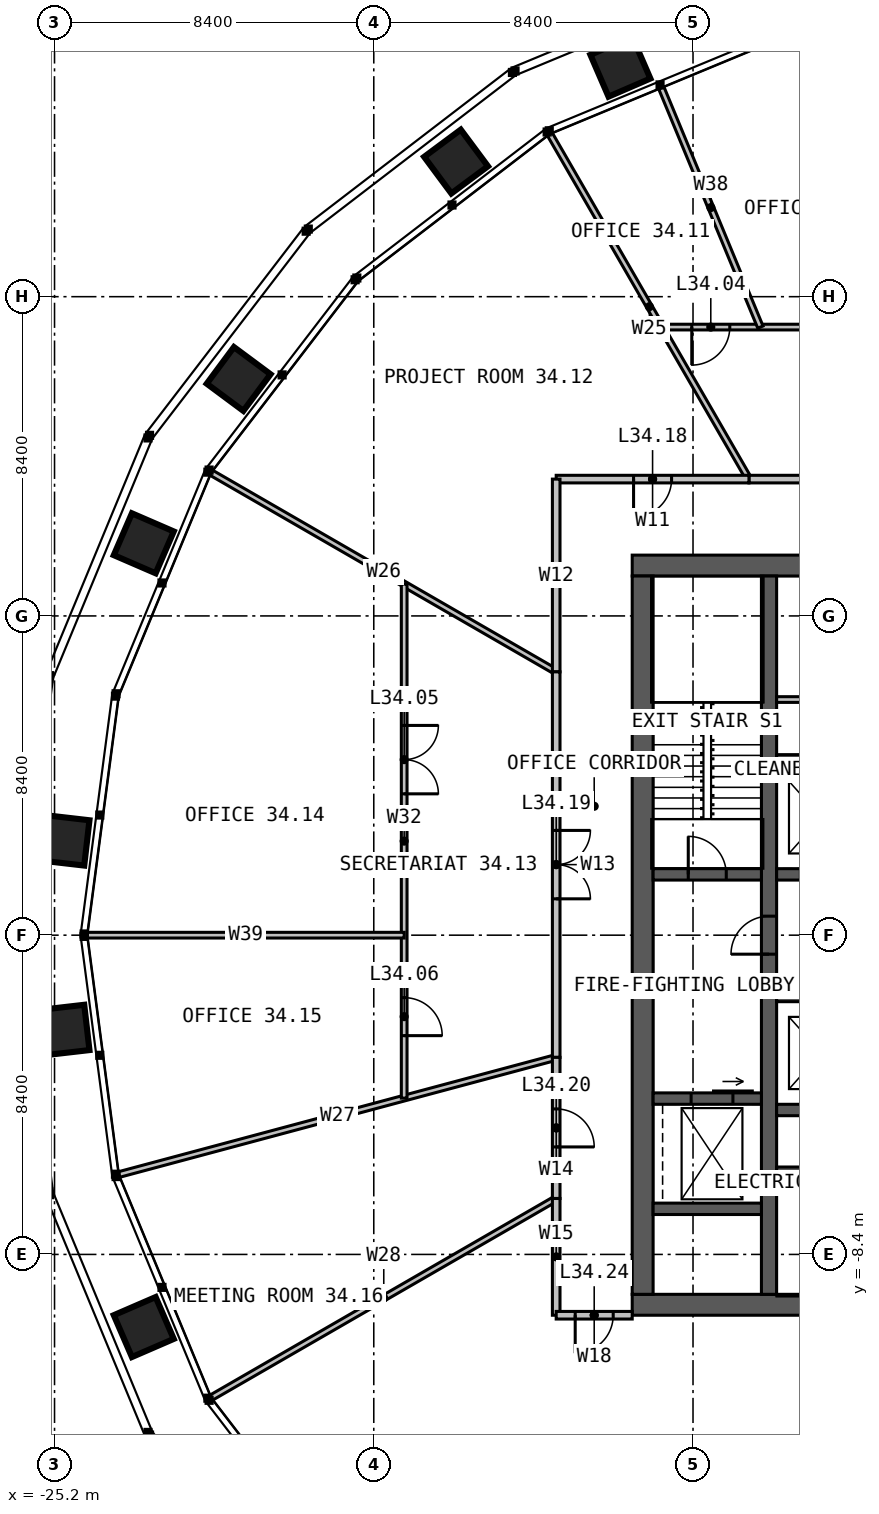
"""IFC4 building model, lengths in metres.
Left out: names, types, materials, properties, quantities, classifications, styles, units other than length and angle.
Written with IfcOpenShell. Run it as: python <this file> out.ifc"""

import sys

from ifc_helpers import new_model, si_unit, direction, frame, frame_2d, origin, place, context, subcontext, project, spatial, rectangle, extrude, element, fill, save


model = new_model("IFC4")
c1 = context("Model", 3, precision=1e-05, world=origin(), true_north=direction((0.0, 1.0)))
c2 = subcontext(c1, "Body", "Model", "MODEL_VIEW")
j1 = project(units=[si_unit("LENGTHUNIT", "METRE"), si_unit("PLANEANGLEUNIT", "RADIAN")], contexts=[c1])
p1 = place(None, origin())
s1 = spatial("IfcSite", under=j1, at=p1, CompositionType="ELEMENT")
p2 = place(p1, origin())
s2 = spatial("IfcBuilding", under=s1, at=p2, CompositionType="ELEMENT")
p3 = place(p2, frame((0.0, 0.0, 142.0)))
s3 = spatial("IfcBuildingStorey", under=s2, at=p3, CompositionType="ELEMENT", Elevation=142.0)
p4 = place(p3, frame((-10.0, 9.725, 0.0), z_axis=(0.0, 0.0, 1.0), x_axis=(1.0, 0.0, 0.0)))
e1 = element("IfcWall", 1, at=p4, inside=s3, PredefinedType="SOLIDWALL", context=c2, shape_type="SweptSolid", body=[
    extrude(rectangle(XDim=20.0, YDim=0.55, at=frame_2d((10.0, 0.0))), origin(), (0.0, 0.0, 1.0), 4.0),
])
p5 = place(p4, frame((9.4, 0.0, 0.0)))
e2 = element("IfcOpeningElement", 2, at=p5, cuts=e1, PredefinedType="OPENING", context=c2, shape_type="SweptSolid", body=[
    extrude(rectangle(XDim=1.2, YDim=2.2, at=frame_2d((0.6, 1.1))), frame((0.0, 0.285, 0.0), z_axis=(0.0, -1.0, 0.0), x_axis=(1.0, 0.0, 0.0)), (0.0, 0.0, 1.0), 0.57),
])
p6 = place(p3, frame((10.0, -9.725, 0.0), z_axis=(0.0, 0.0, 1.0), x_axis=(-1.0, 0.0, 0.0)))
e3 = element("IfcWall", 3, at=p6, inside=s3, PredefinedType="SOLIDWALL", context=c2, shape_type="SweptSolid", body=[
    extrude(rectangle(XDim=20.0, YDim=0.55, at=frame_2d((10.0, 0.0))), origin(), (0.0, 0.0, 1.0), 4.0),
])
p7 = place(p6, frame((6.875, 0.0, 0.0)))
e4 = element("IfcOpeningElement", 4, at=p7, cuts=e3, PredefinedType="OPENING", context=c2, shape_type="SweptSolid", body=[
    extrude(rectangle(XDim=1.2, YDim=2.2, at=frame_2d((0.6, 1.1))), frame((0.0, 0.285, 0.0), z_axis=(0.0, -1.0, 0.0), x_axis=(1.0, 0.0, 0.0)), (0.0, 0.0, 1.0), 0.57),
])
p8 = place(p3, frame((-9.725, 9.45, 0.0), z_axis=(0.0, 0.0, 1.0), x_axis=(0.0, -1.0, 0.0)))
e5 = element("IfcWall", 5, at=p8, inside=s3, PredefinedType="SOLIDWALL", context=c2, shape_type="SweptSolid", body=[
    extrude(rectangle(XDim=18.9, YDim=0.55, at=frame_2d((9.45, 0.0))), origin(), (0.0, 0.0, 1.0), 4.0),
])
p9 = place(p3, frame((-6.4, -9.45, 0.0), z_axis=(0.0, 0.0, 1.0), x_axis=(0.0, 1.0, 0.0)))
e6 = element("IfcWall", 6, at=p9, inside=s3, PredefinedType="SOLIDWALL", context=c2, shape_type="SweptSolid", body=[
    extrude(rectangle(XDim=18.9, YDim=0.4, at=frame_2d((9.45, 0.0))), origin(), (0.0, 0.0, 1.0), 4.0),
])
p10 = place(p9, frame((8.95, 0.0, 0.0)))
e7 = element("IfcOpeningElement", 7, at=p10, cuts=e6, PredefinedType="OPENING", context=c2, shape_type="SweptSolid", body=[
    extrude(rectangle(XDim=1.0, YDim=2.2, at=frame_2d((0.5, 1.1))), frame((0.0, 0.21, 0.0), z_axis=(0.0, -1.0, 0.0), x_axis=(1.0, 0.0, 0.0)), (0.0, 0.0, 1.0), 0.42),
])
p11 = place(p3, frame((-6.2, 1.6, 0.0), z_axis=(0.0, 0.0, 1.0), x_axis=(1.0, 0.0, 0.0)))
e8 = element("IfcWall", 8, at=p11, inside=s3, PredefinedType="SOLIDWALL", context=c2, shape_type="SweptSolid", body=[
    extrude(rectangle(XDim=4.85, YDim=0.3, at=frame_2d((2.425, 0.0))), origin(), (0.0, 0.0, 1.0), 4.0),
])
p12 = place(p11, frame((0.625, 0.0, 0.0)))
e9 = element("IfcOpeningElement", 9, at=p12, cuts=e8, PredefinedType="OPENING", context=c2, shape_type="SweptSolid", body=[
    extrude(rectangle(XDim=1.1, YDim=2.2, at=frame_2d((0.55, 1.1))), frame((0.0, 0.16, 0.0), z_axis=(0.0, -1.0, 0.0), x_axis=(1.0, 0.0, 0.0)), (0.0, 0.0, 1.0), 0.32),
])
p13 = place(p11, frame((3.15, 0.0, 0.0)))
e10 = element("IfcOpeningElement", 10, at=p13, cuts=e8, PredefinedType="OPENING", context=c2, shape_type="SweptSolid", body=[
    extrude(rectangle(XDim=1.1, YDim=2.2, at=frame_2d((0.55, 1.1))), frame((0.0, 0.16, 0.0), z_axis=(0.0, -1.0, 0.0), x_axis=(1.0, 0.0, 0.0)), (0.0, 0.0, 1.0), 0.32),
])
p14 = place(p3, frame((-6.2, 4.6, 0.0), z_axis=(0.0, 0.0, 1.0), x_axis=(1.0, 0.0, 0.0)))
e11 = element("IfcWall", 11, at=p14, inside=s3, PredefinedType="SOLIDWALL", context=c2, shape_type="SweptSolid", body=[
    extrude(rectangle(XDim=4.85, YDim=0.3, at=frame_2d((2.425, 0.0))), origin(), (0.0, 0.0, 1.0), 4.0),
])
for number, where, z_axis, x_axis in (
    (12, (-6.2, -1.6, 0.0), (0.0, 0.0, 1.0), (1.0, 0.0, 0.0)),
    (13, (-6.2, -4.6, 0.0), (0.0, 0.0, 1.0), (1.0, 0.0, 0.0)),
):
    element("IfcWall", number, at=place(p3, frame(where, z_axis=z_axis, x_axis=x_axis)), inside=s3, PredefinedType="SOLIDWALL", context=c2, shape_type="SweptSolid", body=[
        extrude(rectangle(XDim=7.4, YDim=0.3, at=frame_2d((3.7, 0.0))), origin(), (0.0, 0.0, 1.0), 4.0),
    ])
p15 = place(p3, frame((-6.2, -6.2, 0.0), z_axis=(0.0, 0.0, 1.0), x_axis=(1.0, 0.0, 0.0)))
e14 = element("IfcWall", 14, at=p15, inside=s3, PredefinedType="SOLIDWALL", context=c2, shape_type="SweptSolid", body=[
    extrude(rectangle(XDim=7.4, YDim=0.2, at=frame_2d((3.7, 0.0))), origin(), (0.0, 0.0, 1.0), 4.0),
])
p16 = place(p3, frame((-9.45, 1.6, 0.0), z_axis=(0.0, 0.0, 1.0), x_axis=(1.0, 0.0, 0.0)))
e15 = element("IfcWall", 15, at=p16, inside=s3, PredefinedType="SOLIDWALL", context=c2, shape_type="SweptSolid", body=[
    extrude(rectangle(XDim=2.85, YDim=0.3, at=frame_2d((1.425, 0.0))), origin(), (0.0, 0.0, 1.0), 4.0),
])
p17 = place(p16, frame((0.925, 0.0, 0.0)))
e16 = element("IfcOpeningElement", 16, at=p17, cuts=e15, PredefinedType="OPENING", context=c2, shape_type="SweptSolid", body=[
    extrude(rectangle(XDim=1.0, YDim=2.2, at=frame_2d((0.5, 1.1))), frame((0.0, 0.16, 0.0), z_axis=(0.0, -1.0, 0.0), x_axis=(1.0, 0.0, 0.0)), (0.0, 0.0, 1.0), 0.32),
])
p18 = place(p3, frame((-9.45, -4.3, 0.0), z_axis=(0.0, 0.0, 1.0), x_axis=(1.0, 0.0, 0.0)))
e17 = element("IfcWall", 17, at=p18, inside=s3, PredefinedType="SOLIDWALL", context=c2, shape_type="SweptSolid", body=[
    extrude(rectangle(XDim=2.85, YDim=0.3, at=frame_2d((1.425, 0.0))), origin(), (0.0, 0.0, 1.0), 4.0),
])
p19 = place(p18, frame((1.0, 0.0, 0.0)))
e18 = element("IfcOpeningElement", 18, at=p19, cuts=e17, PredefinedType="OPENING", context=c2, shape_type="SweptSolid", body=[
    extrude(rectangle(XDim=1.1, YDim=2.2, at=frame_2d((0.55, 1.1))), frame((0.0, 0.16, 0.0), z_axis=(0.0, -1.0, 0.0), x_axis=(1.0, 0.0, 0.0)), (0.0, 0.0, 1.0), 0.32),
])
p20 = place(p3, frame((-9.45, -7.2, 0.0), z_axis=(0.0, 0.0, 1.0), x_axis=(1.0, 0.0, 0.0)))
e19 = element("IfcWall", 19, at=p20, inside=s3, PredefinedType="SOLIDWALL", context=c2, shape_type="SweptSolid", body=[
    extrude(rectangle(XDim=2.85, YDim=0.3, at=frame_2d((1.425, 0.0))), origin(), (0.0, 0.0, 1.0), 4.0),
])
p21 = place(p3, frame((-6.2, 6.2, 0.0), z_axis=(0.0, 0.0, 1.0), x_axis=(1.0, 0.0, 0.0)))
e20 = element("IfcWall", 20, at=p21, inside=s3, PredefinedType="PARTITIONING", context=c2, shape_type="SweptSolid", body=[
    extrude(rectangle(XDim=4.85, YDim=0.15, at=frame_2d((2.425, 0.0))), origin(), (0.0, 0.0, 1.0), 3.75),
])
p22 = place(p21, frame((3.15, 0.0, 0.0)))
e21 = element("IfcOpeningElement", 21, at=p22, cuts=e20, PredefinedType="OPENING", context=c2, shape_type="SweptSolid", body=[
    extrude(rectangle(XDim=1.0, YDim=2.2, at=frame_2d((0.5, 1.1))), frame((0.0, 0.085, 0.0), z_axis=(0.0, -1.0, 0.0), x_axis=(1.0, 0.0, 0.0)), (0.0, 0.0, 1.0), 0.17),
])
p23 = place(p21, frame((0.75, 0.0, 0.0)))
e22 = element("IfcOpeningElement", 22, at=p23, cuts=e20, PredefinedType="OPENING", context=c2, shape_type="SweptSolid", body=[
    extrude(rectangle(XDim=0.9, YDim=2.2, at=frame_2d((0.45, 1.1))), frame((0.0, 0.085, 0.0), z_axis=(0.0, -1.0, 0.0), x_axis=(1.0, 0.0, 0.0)), (0.0, 0.0, 1.0), 0.17),
])
for number, where, z_axis, x_axis in (
    (23, (-6.928, 12.0, 0.0), (0.0, 0.0, 1.0), (-0.5, 0.866, 0.0)),
    (24, (-12.0, 6.928, 0.0), (0.0, 0.0, 1.0), (-0.866, 0.5, 0.0)),
):
    element("IfcWall", number, at=place(p3, frame(where, z_axis=z_axis, x_axis=x_axis)), inside=s3, PredefinedType="PARTITIONING", context=c2, shape_type="SweptSolid", body=[
        extrude(rectangle(XDim=10.478, YDim=0.15, at=frame_2d((5.239, 0.0))), origin(), (0.0, 0.0, 1.0), 2.79),
    ])
p24 = place(p3, frame((-12.0, -3.215, 0.0), z_axis=(0.0, 0.0, 1.0), x_axis=(-0.965926367889, -0.258817023816, 0.0)))
e25 = element("IfcWall", 25, at=p24, inside=s3, PredefinedType="PARTITIONING", context=c2, shape_type="SweptSolid", body=[
    extrude(rectangle(XDim=11.911, YDim=0.15, at=frame_2d((5.956, 0.0))), origin(), (0.0, 0.0, 1.0), 2.79),
])
p25 = place(p3, frame((-12.0, -6.928, 0.0), z_axis=(0.0, 0.0, 1.0), x_axis=(-0.866029212144, -0.49999340367, 0.0)))
e26 = element("IfcWall", 26, at=p25, inside=s3, PredefinedType="PARTITIONING", context=c2, shape_type="SweptSolid", body=[
    extrude(rectangle(XDim=10.478, YDim=0.15, at=frame_2d((5.239, 0.0))), origin(), (0.0, 0.0, 1.0), 2.79),
])
p26 = place(p3, frame((9.238, 16.0, 0.0), z_axis=(0.0, 0.0, 1.0), x_axis=(-1.0, 0.0, 0.0)))
e27 = element("IfcWall", 27, at=p26, inside=s3, PredefinedType="PARTITIONING", context=c2, shape_type="SweptSolid", body=[
    extrude(rectangle(XDim=18.475, YDim=0.15, at=frame_2d((9.238, 0.0))), origin(), (0.0, 0.0, 1.0), 2.79),
])
p27 = place(p26, frame((3.066, 0.0, 0.0)))
e28 = element("IfcOpeningElement", 28, at=p27, cuts=e27, PredefinedType="OPENING", context=c2, shape_type="SweptSolid", body=[
    extrude(rectangle(XDim=1.0, YDim=2.2, at=frame_2d((0.5, 1.1))), frame((0.0, 0.085, 0.0), z_axis=(0.0, -1.0, 0.0), x_axis=(1.0, 0.0, 0.0)), (0.0, 0.0, 1.0), 0.17),
])
p28 = place(p26, frame((8.738, 0.0, 0.0)))
e29 = element("IfcOpeningElement", 29, at=p28, cuts=e27, PredefinedType="OPENING", context=c2, shape_type="SweptSolid", body=[
    extrude(rectangle(XDim=1.0, YDim=2.2, at=frame_2d((0.5, 1.1))), frame((0.0, 0.085, 0.0), z_axis=(0.0, -1.0, 0.0), x_axis=(1.0, 0.0, 0.0)), (0.0, 0.0, 1.0), 0.17),
])
p29 = place(p26, frame((13.104, 0.0, 0.0)))
e30 = element("IfcOpeningElement", 30, at=p29, cuts=e27, PredefinedType="OPENING", context=c2, shape_type="SweptSolid", body=[
    extrude(rectangle(XDim=1.0, YDim=2.2, at=frame_2d((0.5, 1.1))), frame((0.0, 0.085, 0.0), z_axis=(0.0, -1.0, 0.0), x_axis=(1.0, 0.0, 0.0)), (0.0, 0.0, 1.0), 0.17),
])
p30 = place(p26, frame((16.67, 0.0, 0.0)))
e31 = element("IfcOpeningElement", 31, at=p30, cuts=e27, PredefinedType="OPENING", context=c2, shape_type="SweptSolid", body=[
    extrude(rectangle(XDim=1.0, YDim=2.2, at=frame_2d((0.5, 1.1))), frame((0.0, 0.085, 0.0), z_axis=(0.0, -1.0, 0.0), x_axis=(1.0, 0.0, 0.0)), (0.0, 0.0, 1.0), 0.17),
])
p31 = place(p3, frame((-6.627, 16.0, 0.0), z_axis=(0.0, 0.0, 1.0), x_axis=(-0.382684356981, 0.923879149522, 0.0)))
e32 = element("IfcWall", 32, at=p31, inside=s3, PredefinedType="PARTITIONING", context=c2, shape_type="SweptSolid", body=[
    extrude(rectangle(XDim=6.808, YDim=0.15, at=frame_2d((3.404, 0.0))), origin(), (0.0, 0.0, 1.0), 2.79),
])
p32 = place(p3, frame((6.928, 12.0, 0.0), z_axis=(0.0, 0.0, 1.0), x_axis=(-1.0, 0.0, 0.0)))
e33 = element("IfcWall", 33, at=p32, inside=s3, PredefinedType="PARTITIONING", context=c2, shape_type="SweptSolid", body=[
    extrude(rectangle(XDim=13.856, YDim=0.2, at=frame_2d((6.928, 0.0))), origin(), (0.0, 0.0, 1.0), 3.8),
])
p33 = place(p32, frame((6.028, 0.0, 0.0)))
e34 = element("IfcOpeningElement", 34, at=p33, cuts=e33, PredefinedType="OPENING", context=c2, shape_type="SweptSolid", body=[
    extrude(rectangle(XDim=1.8, YDim=2.2, at=frame_2d((0.9, 1.1))), frame((0.0, 0.11, 0.0), z_axis=(0.0, -1.0, 0.0), x_axis=(1.0, 0.0, 0.0)), (0.0, 0.0, 1.0), 0.22),
])
p34 = place(p3, frame((-6.928, 12.0, 0.0), z_axis=(0.0, 0.0, 1.0), x_axis=(-1.0, 0.0, 0.0)))
e35 = element("IfcWall", 35, at=p34, inside=s3, PredefinedType="PARTITIONING", context=c2, shape_type="SweptSolid", body=[
    extrude(rectangle(XDim=5.072, YDim=0.2, at=frame_2d((2.536, 0.0))), origin(), (0.0, 0.0, 1.0), 3.8),
])
p35 = place(p34, frame((2.036, 0.0, 0.0)))
e36 = element("IfcOpeningElement", 36, at=p35, cuts=e35, PredefinedType="OPENING", context=c2, shape_type="SweptSolid", body=[
    extrude(rectangle(XDim=1.0, YDim=2.2, at=frame_2d((0.5, 1.1))), frame((0.0, 0.11, 0.0), z_axis=(0.0, -1.0, 0.0), x_axis=(1.0, 0.0, 0.0)), (0.0, 0.0, 1.0), 0.22),
])
p36 = place(p3, frame((-12.0, 12.0, 0.0), z_axis=(0.0, 0.0, 1.0), x_axis=(0.0, -1.0, 0.0)))
e37 = element("IfcWall", 37, at=p36, inside=s3, PredefinedType="PARTITIONING", context=c2, shape_type="SweptSolid", body=[
    extrude(rectangle(XDim=5.072, YDim=0.2, at=frame_2d((2.536, 0.0))), origin(), (0.0, 0.0, 1.0), 3.8),
])
p37 = place(p3, frame((-16.0, 9.238, 0.0), z_axis=(0.0, 0.0, 1.0), x_axis=(0.0, -1.0, 0.0)))
e38 = element("IfcWall", 38, at=p37, inside=s3, PredefinedType="PARTITIONING", context=c2, shape_type="SweptSolid", body=[
    extrude(rectangle(XDim=13.525, YDim=0.15, at=frame_2d((6.762, 0.0))), origin(), (0.0, 0.0, 1.0), 2.79),
])
p38 = place(p37, frame((3.719, 0.0, 0.0)))
e39 = element("IfcOpeningElement", 39, at=p38, cuts=e38, PredefinedType="OPENING", context=c2, shape_type="SweptSolid", body=[
    extrude(rectangle(XDim=1.8, YDim=2.2, at=frame_2d((0.9, 1.1))), frame((0.0, 0.085, 0.0), z_axis=(0.0, -1.0, 0.0), x_axis=(1.0, 0.0, 0.0)), (0.0, 0.0, 1.0), 0.17),
])
p39 = place(p37, frame((10.881, 0.0, 0.0)))
e40 = element("IfcOpeningElement", 40, at=p39, cuts=e38, PredefinedType="OPENING", context=c2, shape_type="SweptSolid", body=[
    extrude(rectangle(XDim=1.0, YDim=2.2, at=frame_2d((0.5, 1.1))), frame((0.0, 0.085, 0.0), z_axis=(0.0, -1.0, 0.0), x_axis=(1.0, 0.0, 0.0)), (0.0, 0.0, 1.0), 0.17),
])
p40 = place(p3, frame((-16.0, 0.0, 0.0), z_axis=(0.0, 0.0, 1.0), x_axis=(-1.0, 0.0, 0.0)))
e41 = element("IfcWall", 41, at=p40, inside=s3, PredefinedType="PARTITIONING", context=c2, shape_type="SweptSolid", body=[
    extrude(rectangle(XDim=8.334, YDim=0.15, at=frame_2d((4.167, 0.0))), origin(), (0.0, 0.0, 1.0), 2.79),
])
p41 = place(p3, frame((-12.0, 6.928, 0.0), z_axis=(0.0, 0.0, 1.0), x_axis=(0.0, -1.0, 0.0)))
e42 = element("IfcWall", 42, at=p41, inside=s3, PredefinedType="PARTITIONING", context=c2, shape_type="SweptSolid", body=[
    extrude(rectangle(XDim=10.144, YDim=0.2, at=frame_2d((5.072, 0.0))), origin(), (0.0, 0.0, 1.0), 3.8),
])
p42 = place(p41, frame((4.172, 0.0, 0.0)))
e43 = element("IfcOpeningElement", 43, at=p42, cuts=e42, PredefinedType="OPENING", context=c2, shape_type="SweptSolid", body=[
    extrude(rectangle(XDim=1.8, YDim=2.2, at=frame_2d((0.9, 1.1))), frame((0.0, 0.11, 0.0), z_axis=(0.0, -1.0, 0.0), x_axis=(1.0, 0.0, 0.0)), (0.0, 0.0, 1.0), 0.22),
])
p43 = place(p3, frame((-12.0, -3.215, 0.0), z_axis=(0.0, 0.0, 1.0), x_axis=(0.0, -1.0, 0.0)))
e44 = element("IfcWall", 44, at=p43, inside=s3, PredefinedType="PARTITIONING", context=c2, shape_type="SweptSolid", body=[
    extrude(rectangle(XDim=3.713, YDim=0.2, at=frame_2d((1.856, 0.0))), origin(), (0.0, 0.0, 1.0), 3.8),
])
p44 = place(p43, frame((1.356, 0.0, 0.0)))
e45 = element("IfcOpeningElement", 45, at=p44, cuts=e44, PredefinedType="OPENING", context=c2, shape_type="SweptSolid", body=[
    extrude(rectangle(XDim=1.0, YDim=2.2, at=frame_2d((0.5, 1.1))), frame((0.0, 0.11, 0.0), z_axis=(0.0, -1.0, 0.0), x_axis=(1.0, 0.0, 0.0)), (0.0, 0.0, 1.0), 0.22),
])
p45 = place(p3, frame((-12.0, -6.928, 0.0), z_axis=(0.0, 0.0, 1.0), x_axis=(0.0, -1.0, 0.0)))
e46 = element("IfcWall", 46, at=p45, inside=s3, PredefinedType="PARTITIONING", context=c2, shape_type="SweptSolid", body=[
    extrude(rectangle(XDim=3.072, YDim=0.2, at=frame_2d((1.536, 0.0))), origin(), (0.0, 0.0, 1.0), 3.8),
])
p46 = place(p3, frame((-10.0, -10.0, 0.0), z_axis=(0.0, 0.0, 1.0), x_axis=(-1.0, 0.0, 0.0)))
e47 = element("IfcWall", 47, at=p46, inside=s3, PredefinedType="PARTITIONING", context=c2, shape_type="SweptSolid", body=[
    extrude(rectangle(XDim=2.0, YDim=0.2, at=frame_2d((1.0, 0.0))), origin(), (0.0, 0.0, 1.0), 3.8),
])
p47 = place(p46, frame((0.5, 0.0, 0.0)))
e48 = element("IfcOpeningElement", 48, at=p47, cuts=e47, PredefinedType="OPENING", context=c2, shape_type="SweptSolid", body=[
    extrude(rectangle(XDim=1.0, YDim=2.2, at=frame_2d((0.5, 1.1))), frame((0.0, 0.11, 0.0), z_axis=(0.0, -1.0, 0.0), x_axis=(1.0, 0.0, 0.0)), (0.0, 0.0, 1.0), 0.22),
])
p48 = place(p10, origin())
e49 = element("IfcDoor", 49, at=p48, inside=s3, OperationType="SINGLE_SWING_LEFT", PredefinedType="DOOR", context=c2, shape_type="SweptSolid", body=[
    extrude(rectangle(XDim=1.0, YDim=2.2, at=frame_2d((0.5, 1.1))), frame((0.0, 0.025, 0.0), z_axis=(0.0, -1.0, 0.0), x_axis=(1.0, 0.0, 0.0)), (0.0, 0.0, 1.0), 0.05),
])
fill(e7, e49)
p49 = place(p17, origin())
e50 = element("IfcDoor", 50, at=p49, inside=s3, OperationType="SINGLE_SWING_LEFT", PredefinedType="DOOR", context=c2, shape_type="SweptSolid", body=[
    extrude(rectangle(XDim=1.0, YDim=2.2, at=frame_2d((0.5, 1.1))), frame((0.0, 0.025, 0.0), z_axis=(0.0, -1.0, 0.0), x_axis=(1.0, 0.0, 0.0)), (0.0, 0.0, 1.0), 0.05),
])
fill(e16, e50)
p50 = place(p19, origin())
e51 = element("IfcDoor", 51, at=p50, inside=s3, OperationType="SLIDING_TO_LEFT", PredefinedType="DOOR", context=c2, shape_type="SweptSolid", body=[
    extrude(rectangle(XDim=1.1, YDim=2.2, at=frame_2d((0.55, 1.1))), frame((0.0, 0.025, 0.0), z_axis=(0.0, -1.0, 0.0), x_axis=(1.0, 0.0, 0.0)), (0.0, 0.0, 1.0), 0.05),
])
fill(e18, e51)
p51 = place(p30, origin())
e52 = element("IfcDoor", 52, at=p51, inside=s3, OperationType="SINGLE_SWING_RIGHT", PredefinedType="DOOR", context=c2, shape_type="SweptSolid", body=[
    extrude(rectangle(XDim=1.0, YDim=2.2, at=frame_2d((0.5, 1.1))), frame((0.0, 0.025, 0.0), z_axis=(0.0, -1.0, 0.0), x_axis=(1.0, 0.0, 0.0)), (0.0, 0.0, 1.0), 0.05),
])
fill(e31, e52)
p52 = place(p35, origin())
e53 = element("IfcDoor", 53, at=p52, inside=s3, OperationType="SINGLE_SWING_RIGHT", PredefinedType="DOOR", context=c2, shape_type="SweptSolid", body=[
    extrude(rectangle(XDim=1.0, YDim=2.2, at=frame_2d((0.5, 1.1))), frame((0.0, 0.025, 0.0), z_axis=(0.0, -1.0, 0.0), x_axis=(1.0, 0.0, 0.0)), (0.0, 0.0, 1.0), 0.05),
])
fill(e36, e53)
p53 = place(p38, origin())
e54 = element("IfcDoor", 54, at=p53, inside=s3, OperationType="DOUBLE_DOOR_SINGLE_SWING", PredefinedType="DOOR", context=c2, shape_type="SweptSolid", body=[
    extrude(rectangle(XDim=1.8, YDim=2.2, at=frame_2d((0.9, 1.1))), frame((0.0, 0.025, 0.0), z_axis=(0.0, -1.0, 0.0), x_axis=(1.0, 0.0, 0.0)), (0.0, 0.0, 1.0), 0.05),
])
fill(e39, e54)
p54 = place(p39, origin())
e55 = element("IfcDoor", 55, at=p54, inside=s3, OperationType="SINGLE_SWING_RIGHT", PredefinedType="DOOR", context=c2, shape_type="SweptSolid", body=[
    extrude(rectangle(XDim=1.0, YDim=2.2, at=frame_2d((0.5, 1.1))), frame((0.0, 0.025, 0.0), z_axis=(0.0, -1.0, 0.0), x_axis=(1.0, 0.0, 0.0)), (0.0, 0.0, 1.0), 0.05),
])
fill(e40, e55)
p55 = place(p42, origin())
e56 = element("IfcDoor", 56, at=p55, inside=s3, OperationType="DOUBLE_DOOR_SINGLE_SWING", PredefinedType="DOOR", context=c2, shape_type="SweptSolid", body=[
    extrude(rectangle(XDim=1.8, YDim=2.2, at=frame_2d((0.9, 1.1))), frame((0.0, 0.025, 0.0), z_axis=(0.0, -1.0, 0.0), x_axis=(1.0, 0.0, 0.0)), (0.0, 0.0, 1.0), 0.05),
])
fill(e43, e56)
p56 = place(p44, origin())
e57 = element("IfcDoor", 57, at=p56, inside=s3, OperationType="SINGLE_SWING_RIGHT", PredefinedType="DOOR", context=c2, shape_type="SweptSolid", body=[
    extrude(rectangle(XDim=1.0, YDim=2.2, at=frame_2d((0.5, 1.1))), frame((0.0, 0.025, 0.0), z_axis=(0.0, -1.0, 0.0), x_axis=(1.0, 0.0, 0.0)), (0.0, 0.0, 1.0), 0.05),
])
fill(e45, e57)
p57 = place(p47, origin())
e58 = element("IfcDoor", 58, at=p57, inside=s3, OperationType="SINGLE_SWING_RIGHT", PredefinedType="DOOR", context=c2, shape_type="SweptSolid", body=[
    extrude(rectangle(XDim=1.0, YDim=2.2, at=frame_2d((0.5, 1.1))), frame((0.0, 0.025, 0.0), z_axis=(0.0, -1.0, 0.0), x_axis=(1.0, 0.0, 0.0)), (0.0, 0.0, 1.0), 0.05),
])
fill(e48, e58)
save(model, sys.argv[1])
